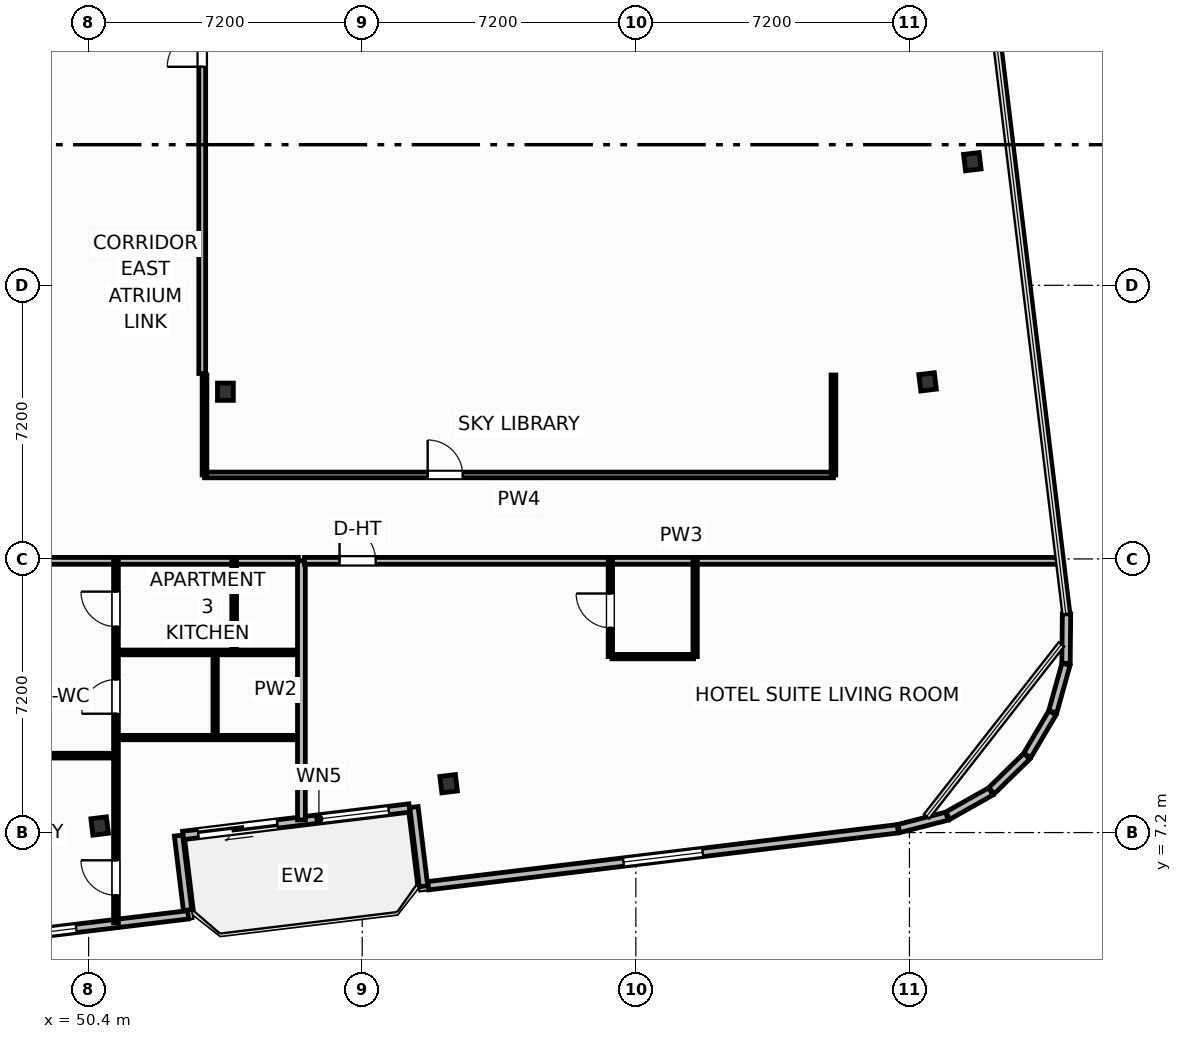
"""IFC4 building model, lengths in metres.
Left out: names, types, materials, properties, quantities, classifications, styles, units other than length and angle.
Written with IfcOpenShell. Run it as: python <this file> out.ifc"""

import sys

from ifc_helpers import new_model, si_unit, direction, frame, frame_2d, origin, origin_2d, place, context, subcontext, project, spatial, rectangle, i_section, extrude, element, fill, save


model = new_model("IFC4")
c1 = context("Model", 3, precision=1e-05, world=origin(), true_north=direction((0.0, 1.0)))
c2 = subcontext(c1, "Body", "Model", "MODEL_VIEW")
j1 = project(units=[si_unit("LENGTHUNIT", "METRE"), si_unit("PLANEANGLEUNIT", "RADIAN")], contexts=[c1])
p1 = place(None, origin())
s1 = spatial("IfcSite", under=j1, at=p1, CompositionType="ELEMENT")
p2 = place(p1, origin())
s2 = spatial("IfcBuilding", under=s1, at=p2, CompositionType="ELEMENT")
p3 = place(p2, frame((0.0, 0.0, 182.0)))
s3 = spatial("IfcBuildingStorey", under=s2, at=p3, CompositionType="ELEMENT", Elevation=182.0)
p4 = place(p3, frame((54.0, 18.8, 0.0), z_axis=(0.0, 0.0, 1.0), x_axis=(1.0, 0.0, 0.0)))
e1 = element("IfcColumn", 1, at=p4, inside=s3, PredefinedType="COLUMN", context=c2, shape_type="SweptSolid", body=[
    extrude(i_section(OverallWidth=0.418, OverallDepth=0.455, WebThickness=0.042, FlangeThickness=0.068, FilletRadius=0.025, at=origin_2d()), origin(), (0.0, 0.0, 1.0), 3.7),
])
for number, where, z_axis, x_axis in (
    (2, (50.691, 7.373, 0.0), (0.0, 0.0, 1.0), (0.993, 0.12, 0.0)),
    (3, (59.874, 8.486, 0.0), (0.0, 0.0, 1.0), (0.993, 0.12, 0.0)),
    (4, (72.477, 19.059, 0.0), (0.0, 0.0, 1.0), (0.993, 0.12, 0.0)),
    (5, (73.654, 24.853, 0.0), (0.0, 0.0, 1.0), (0.993, 0.12, 0.0)),
):
    element("IfcColumn", number, at=place(p3, frame(where, z_axis=z_axis, x_axis=x_axis)), inside=s3, PredefinedType="COLUMN", context=c2, shape_type="SweptSolid", body=[
        extrude(i_section(OverallWidth=0.412, OverallDepth=0.435, WebThickness=0.036, FlangeThickness=0.057, FilletRadius=0.025, at=origin_2d()), origin(), (0.0, 0.0, 1.0), 3.7),
    ])
p5 = place(p3, frame((58.843, 7.847, 0.0), z_axis=(0.0, 0.0, 1.0), x_axis=(-0.992729951822, -0.120362962556, 0.0)))
e6 = element("IfcWall", 6, at=p5, inside=s3, PredefinedType="SOLIDWALL", context=c2, shape_type="SweptSolid", body=[
    extrude(rectangle(XDim=6.0, YDim=0.22, at=frame_2d((3.0, 0.0))), origin(), (0.0, 0.0, 1.0), 2.73),
])
p6 = place(p5, frame((3.5, 0.0, 0.0)))
e7 = element("IfcOpeningElement", 7, at=p6, cuts=e6, PredefinedType="OPENING", context=c2, shape_type="SweptSolid", body=[
    extrude(rectangle(XDim=2.1, YDim=2.3, at=frame_2d((1.05, 1.15))), frame((0.0, 0.12, 0.0), z_axis=(0.0, -1.0, 0.0), x_axis=(1.0, 0.0, 0.0)), (0.0, 0.0, 1.0), 0.24),
])
p7 = place(p5, frame((0.55, 0.0, 0.75)))
e8 = element("IfcOpeningElement", 8, at=p7, cuts=e6, PredefinedType="OPENING", context=c2, shape_type="SweptSolid", body=[
    extrude(rectangle(XDim=1.85, YDim=1.75, at=frame_2d((0.925, 0.875))), frame((0.0, 0.12, 0.0), z_axis=(0.0, -1.0, 0.0), x_axis=(1.0, 0.0, 0.0)), (0.0, 0.0, 1.0), 0.24),
])
p8 = place(p3, frame((45.042, 4.069, 0.0), z_axis=(0.0, 0.0, 1.0), x_axis=(0.992731032022, 0.120354052946, 0.0)))
e9 = element("IfcWall", 9, at=p8, inside=s3, PredefinedType="SOLIDWALL", context=c2, shape_type="SweptSolid", body=[
    extrude(rectangle(XDim=8.035, YDim=0.22, at=frame_2d((4.018, 0.0))), origin(), (0.0, 0.0, 1.0), 2.73),
])
p9 = place(p8, frame((2.968, 0.0, 0.8)))
e10 = element("IfcOpeningElement", 10, at=p9, cuts=e9, PredefinedType="OPENING", context=c2, shape_type="SweptSolid", body=[
    extrude(rectangle(XDim=2.1, YDim=1.75, at=frame_2d((1.05, 0.875))), frame((0.0, 0.12, 0.0), z_axis=(0.0, -1.0, 0.0), x_axis=(1.0, 0.0, 0.0)), (0.0, 0.0, 1.0), 0.24),
])
p10 = place(p3, frame((53.004, 5.16, 0.0), z_axis=(0.0, 0.0, 1.0), x_axis=(-0.120397815541, 0.992725725472, 0.0)))
e11 = element("IfcWall", 11, at=p10, inside=s3, PredefinedType="SOLIDWALL", context=c2, shape_type="SweptSolid", body=[
    extrude(rectangle(XDim=1.975, YDim=0.22, at=frame_2d((0.988, 0.0))), origin(), (0.0, 0.0, 1.0), 2.73),
])
p11 = place(p3, frame((58.961, 7.872, 0.0), z_axis=(0.0, 0.0, 1.0), x_axis=(0.120327895535, -0.992734202874, 0.0)))
e12 = element("IfcWall", 12, at=p11, inside=s3, PredefinedType="SOLIDWALL", context=c2, shape_type="SweptSolid", body=[
    extrude(rectangle(XDim=2.1, YDim=0.22, at=frame_2d((1.05, 0.0))), origin(), (0.0, 0.0, 1.0), 2.73),
])
p12 = place(p3, frame((59.338, 5.802, 0.0), z_axis=(0.0, 0.0, 1.0), x_axis=(0.992731225757, 0.120352454927, 0.0)))
e13 = element("IfcWall", 13, at=p12, inside=s3, PredefinedType="SOLIDWALL", context=c2, shape_type="SweptSolid", body=[
    extrude(rectangle(XDim=12.447, YDim=0.22, at=frame_2d((6.224, 0.0))), origin(), (0.0, 0.0, 1.0), 2.73),
])
p13 = place(p12, frame((5.174, 0.0, 0.8)))
e14 = element("IfcOpeningElement", 14, at=p13, cuts=e13, PredefinedType="OPENING", context=c2, shape_type="SweptSolid", body=[
    extrude(rectangle(XDim=2.1, YDim=1.75, at=frame_2d((1.05, 0.875))), frame((0.0, 0.12, 0.0), z_axis=(0.0, -1.0, 0.0), x_axis=(1.0, 0.0, 0.0)), (0.0, 0.0, 1.0), 0.24),
])
p14 = place(p3, frame((71.719, 7.306, 0.0), z_axis=(0.0, 0.0, 1.0), x_axis=(0.968541764193, 0.248851061909, 0.0)))
e15 = element("IfcWall", 15, at=p14, inside=s3, PredefinedType="SOLIDWALL", context=c2, shape_type="SweptSolid", body=[
    extrude(rectangle(XDim=1.309, YDim=0.22, at=frame_2d((0.654, 0.0))), origin(), (0.0, 0.0, 1.0), 2.73),
])
for number, where, z_axis, x_axis in (
    (16, (73.008, 7.644, 0.0), (0.0, 0.0, 1.0), (0.871, 0.491, 0.0)),
    (17, (74.159, 8.3, 0.0), (0.0, 0.0, 1.0), (0.714, 0.7, 0.0)),
    (18, (75.101, 9.232, 0.0), (0.0, 0.0, 1.0), (0.509, 0.861, 0.0)),
    (19, (75.77, 10.376, 0.0), (0.0, 0.0, 1.0), (0.269, 0.963, 0.0)),
):
    element("IfcWall", number, at=place(p3, frame(where, z_axis=z_axis, x_axis=x_axis)), inside=s3, PredefinedType="SOLIDWALL", context=c2, shape_type="SweptSolid", body=[
        extrude(rectangle(XDim=1.301, YDim=0.22, at=frame_2d((0.65, 0.0))), origin(), (0.0, 0.0, 1.0), 2.73),
    ])
p15 = place(p3, frame((76.12, 11.654, 0.0), z_axis=(0.0, 0.0, 1.0), x_axis=(0.01032033607, 0.999946743914, 0.0)))
e20 = element("IfcWall", 20, at=p15, inside=s3, PredefinedType="SOLIDWALL", context=c2, shape_type="SweptSolid", body=[
    extrude(rectangle(XDim=1.301, YDim=0.22, at=frame_2d((0.65, 0.0))), origin(), (0.0, 0.0, 1.0), 2.73),
])
p16 = place(p3, frame((53.45, 16.61, 0.0), z_axis=(0.0, 0.0, 1.0), x_axis=(1.0, 0.0, 0.0)))
e21 = element("IfcWall", 21, at=p16, inside=s3, PredefinedType="PARTITIONING", context=c2, shape_type="SweptSolid", body=[
    extrude(rectangle(XDim=16.55, YDim=0.15, at=frame_2d((8.275, 0.0))), origin(), (0.0, 0.0, 1.0), 3.45),
])
p17 = place(p16, frame((5.873, 0.0, 0.0)))
e22 = element("IfcOpeningElement", 22, at=p17, cuts=e21, PredefinedType="OPENING", context=c2, shape_type="SweptSolid", body=[
    extrude(rectangle(XDim=0.92, YDim=2.05, at=frame_2d((0.46, 1.025))), frame((0.0, 0.085, 0.0), z_axis=(0.0, -1.0, 0.0), x_axis=(1.0, 0.0, 0.0)), (0.0, 0.0, 1.0), 0.17),
])
p18 = place(p3, frame((53.45, 16.61, 0.0), z_axis=(0.0, 0.0, 1.0), x_axis=(0.0, 1.0, 0.0)))
e23 = element("IfcWall", 23, at=p18, inside=s3, PredefinedType="PARTITIONING", context=c2, shape_type="SweptSolid", body=[
    extrude(rectangle(XDim=2.63, YDim=0.125, at=frame_2d((1.315, 0.0))), origin(), (0.0, 0.0, 1.0), 2.662),
])
p19 = place(p3, frame((70.0, 16.61, 0.0), z_axis=(0.0, 0.0, 1.0), x_axis=(0.0, 1.0, 0.0)))
e24 = element("IfcWall", 24, at=p19, inside=s3, PredefinedType="PARTITIONING", context=c2, shape_type="SweptSolid", body=[
    extrude(rectangle(XDim=2.63, YDim=0.125, at=frame_2d((1.315, 0.0))), origin(), (0.0, 0.0, 1.0), 3.45),
])
p20 = place(p3, frame((42.08, 9.224, 0.0), z_axis=(0.0, 0.0, 1.0), x_axis=(1.0, 0.0, 0.0)))
e25 = element("IfcWall", 25, at=p20, inside=s3, PredefinedType="PARTITIONING", context=c2, shape_type="SweptSolid", body=[
    extrude(rectangle(XDim=8.97, YDim=0.125, at=frame_2d((4.485, 0.0))), origin(), (0.0, 0.0, 1.0), 3.45),
])
p21 = place(p20, frame((4.037, 0.0, 0.0)))
e26 = element("IfcOpeningElement", 26, at=p21, cuts=e25, PredefinedType="OPENING", context=c2, shape_type="SweptSolid", body=[
    extrude(rectangle(XDim=0.92, YDim=2.05, at=frame_2d((0.46, 1.025))), frame((0.0, 0.073, 0.0), z_axis=(0.0, -1.0, 0.0), x_axis=(1.0, 0.0, 0.0)), (0.0, 0.0, 1.0), 0.145),
])
p22 = place(p3, frame((42.08, 14.35, 0.0), z_axis=(0.0, 0.0, 1.0), x_axis=(1.0, 0.0, 0.0)))
e27 = element("IfcWall", 27, at=p22, inside=s3, PredefinedType="PARTITIONING", context=c2, shape_type="SweptSolid", body=[
    extrude(rectangle(XDim=13.84, YDim=0.18, at=frame_2d((6.92, 0.0))), origin(), (0.0, 0.0, 1.0), 3.45),
])
p23 = place(p22, frame((3.985, 0.0, 0.0)))
e28 = element("IfcOpeningElement", 28, at=p23, cuts=e27, PredefinedType="OPENING", context=c2, shape_type="SweptSolid", body=[
    extrude(rectangle(XDim=1.0, YDim=2.2, at=frame_2d((0.5, 1.1))), frame((0.0, 0.1, 0.0), z_axis=(0.0, -1.0, 0.0), x_axis=(1.0, 0.0, 0.0)), (0.0, 0.0, 1.0), 0.2),
])
p24 = place(p3, frame((51.12, 4.826, 0.0), z_axis=(0.0, 0.0, 1.0), x_axis=(0.0, 1.0, 0.0)))
e29 = element("IfcWall", 29, at=p24, inside=s3, PredefinedType="PARTITIONING", context=c2, shape_type="SweptSolid", body=[
    extrude(rectangle(XDim=9.524, YDim=0.125, at=frame_2d((4.762, 0.0))), origin(), (0.0, 0.0, 1.0), 2.662),
])
p25 = place(p24, frame((0.725, 0.0, 0.0)))
e30 = element("IfcOpeningElement", 30, at=p25, cuts=e29, PredefinedType="OPENING", context=c2, shape_type="SweptSolid", body=[
    extrude(rectangle(XDim=0.92, YDim=2.05, at=frame_2d((0.46, 1.025))), frame((0.0, 0.073, 0.0), z_axis=(0.0, -1.0, 0.0), x_axis=(1.0, 0.0, 0.0)), (0.0, 0.0, 1.0), 0.145),
])
p26 = place(p24, frame((5.502, 0.0, 0.0)))
e31 = element("IfcOpeningElement", 31, at=p26, cuts=e29, PredefinedType="OPENING", context=c2, shape_type="SweptSolid", body=[
    extrude(rectangle(XDim=0.9, YDim=2.05, at=frame_2d((0.45, 1.025))), frame((0.0, 0.073, 0.0), z_axis=(0.0, -1.0, 0.0), x_axis=(1.0, 0.0, 0.0)), (0.0, 0.0, 1.0), 0.145),
])
p27 = place(p24, frame((7.794, 0.0, 0.0)))
e32 = element("IfcOpeningElement", 32, at=p27, cuts=e29, PredefinedType="OPENING", context=c2, shape_type="SweptSolid", body=[
    extrude(rectangle(XDim=0.92, YDim=2.05, at=frame_2d((0.46, 1.025))), frame((0.0, 0.073, 0.0), z_axis=(0.0, -1.0, 0.0), x_axis=(1.0, 0.0, 0.0)), (0.0, 0.0, 1.0), 0.145),
])
p28 = place(p3, frame((51.19, 11.94, 0.0), z_axis=(0.0, 0.0, 1.0), x_axis=(1.0, 0.0, 0.0)))
e33 = element("IfcWall", 33, at=p28, inside=s3, PredefinedType="PARTITIONING", context=c2, shape_type="SweptSolid", body=[
    extrude(rectangle(XDim=4.73, YDim=0.125, at=frame_2d((2.365, 0.0))), origin(), (0.0, 0.0, 1.0), 3.018),
])
p29 = place(p3, frame((51.19, 9.7, 0.0), z_axis=(0.0, 0.0, 1.0), x_axis=(1.0, 0.0, 0.0)))
e34 = element("IfcWall", 34, at=p29, inside=s3, PredefinedType="PARTITIONING", context=c2, shape_type="SweptSolid", body=[
    extrude(rectangle(XDim=4.73, YDim=0.115, at=frame_2d((2.365, 0.0))), origin(), (0.0, 0.0, 1.0), 3.45),
])
p30 = place(p3, frame((54.23, 11.94, 0.0), z_axis=(0.0, 0.0, 1.0), x_axis=(0.0, 1.0, 0.0)))
e35 = element("IfcWall", 35, at=p30, inside=s3, PredefinedType="PARTITIONING", context=c2, shape_type="SweptSolid", body=[
    extrude(rectangle(XDim=2.41, YDim=0.125, at=frame_2d((1.205, 0.0))), origin(), (0.0, 0.0, 1.0), 3.45),
])
p31 = place(p3, frame((53.73, 9.7, 0.0), z_axis=(0.0, 0.0, 1.0), x_axis=(0.0, 1.0, 0.0)))
e36 = element("IfcWall", 36, at=p31, inside=s3, PredefinedType="PARTITIONING", context=c2, shape_type="SweptSolid", body=[
    extrude(rectangle(XDim=2.24, YDim=0.115, at=frame_2d((1.12, 0.0))), origin(), (0.0, 0.0, 1.0), 3.45),
])
p32 = place(p3, frame((56.0, 7.533, 0.0), z_axis=(0.0, 0.0, 1.0), x_axis=(0.0, 1.0, 0.0)))
e37 = element("IfcWall", 37, at=p32, inside=s3, PredefinedType="PARTITIONING", context=c2, shape_type="SweptSolid", body=[
    extrude(rectangle(XDim=6.817, YDim=0.205, at=frame_2d((3.409, 0.0))), origin(), (0.0, 0.0, 1.0), 3.45),
])
p33 = place(p3, frame((56.08, 14.35, 0.0), z_axis=(0.0, 0.0, 1.0), x_axis=(1.0, 0.0, 0.0)))
e38 = element("IfcWall", 38, at=p33, inside=s3, PredefinedType="PARTITIONING", context=c2, shape_type="SweptSolid", body=[
    extrude(rectangle(XDim=19.825, YDim=0.18, at=frame_2d((9.912, 0.0))), origin(), (0.0, 0.0, 1.0), 3.45),
])
p34 = place(p33, frame((0.923, 0.0, 0.0)))
e39 = element("IfcOpeningElement", 39, at=p34, cuts=e38, PredefinedType="OPENING", context=c2, shape_type="SweptSolid", body=[
    extrude(rectangle(XDim=0.95, YDim=2.15, at=frame_2d((0.475, 1.075))), frame((0.0, 0.1, 0.0), z_axis=(0.0, -1.0, 0.0), x_axis=(1.0, 0.0, 0.0)), (0.0, 0.0, 1.0), 0.2),
])
p35 = place(p3, frame((64.17, 11.83, 0.0), z_axis=(0.0, 0.0, 1.0), x_axis=(1.0, 0.0, 0.0)))
e40 = element("IfcWall", 40, at=p35, inside=s3, PredefinedType="PARTITIONING", context=c2, shape_type="SweptSolid", body=[
    extrude(rectangle(XDim=2.15, YDim=0.115, at=frame_2d((1.075, 0.0))), origin(), (0.0, 0.0, 1.0), 3.45),
])
p36 = place(p3, frame((64.13, 11.83, 0.0), z_axis=(0.0, 0.0, 1.0), x_axis=(0.0, 1.0, 0.0)))
e41 = element("IfcWall", 41, at=p36, inside=s3, PredefinedType="PARTITIONING", context=c2, shape_type="SweptSolid", body=[
    extrude(rectangle(XDim=2.52, YDim=0.115, at=frame_2d((1.26, 0.0))), origin(), (0.0, 0.0, 1.0), 3.45),
])
p37 = place(p36, frame((0.76, 0.0, 0.0)))
e42 = element("IfcOpeningElement", 42, at=p37, cuts=e41, PredefinedType="OPENING", context=c2, shape_type="SweptSolid", body=[
    extrude(rectangle(XDim=0.9, YDim=2.05, at=frame_2d((0.45, 1.025))), frame((0.0, 0.067, 0.0), z_axis=(0.0, -1.0, 0.0), x_axis=(1.0, 0.0, 0.0)), (0.0, 0.0, 1.0), 0.135),
])
p38 = place(p3, frame((66.36, 11.83, 0.0), z_axis=(0.0, 0.0, 1.0), x_axis=(0.0, 1.0, 0.0)))
e43 = element("IfcWall", 43, at=p38, inside=s3, PredefinedType="PARTITIONING", context=c2, shape_type="SweptSolid", body=[
    extrude(rectangle(XDim=2.52, YDim=0.115, at=frame_2d((1.26, 0.0))), origin(), (0.0, 0.0, 1.0), 3.45),
])
p39 = place(p3, frame((53.39, 19.28, 0.0), z_axis=(0.0, 0.0, 1.0), x_axis=(0.0, 1.0, 0.0)))
e44 = element("IfcWall", 44, at=p39, inside=s3, PredefinedType="PARTITIONING", context=c2, shape_type="SweptSolid", body=[
    extrude(rectangle(XDim=20.02, YDim=0.18, at=frame_2d((10.01, 0.0))), origin(), (0.0, 0.0, 1.0), 3.45),
])
p40 = place(p39, frame((8.07, 0.0, 0.0)))
e45 = element("IfcOpeningElement", 45, at=p40, cuts=e44, PredefinedType="OPENING", context=c2, shape_type="SweptSolid", body=[
    extrude(rectangle(XDim=0.92, YDim=2.05, at=frame_2d((0.46, 1.025))), frame((0.0, 0.1, 0.0), z_axis=(0.0, -1.0, 0.0), x_axis=(1.0, 0.0, 0.0)), (0.0, 0.0, 1.0), 0.2),
])
p41 = place(p6, origin())
e46 = element("IfcDoor", 46, at=p41, inside=s3, OperationType="SLIDING_TO_LEFT", PredefinedType="DOOR", context=c2, shape_type="SweptSolid", body=[
    extrude(rectangle(XDim=2.1, YDim=2.3, at=frame_2d((1.05, 1.15))), frame((0.0, 0.025, 0.0), z_axis=(0.0, -1.0, 0.0), x_axis=(1.0, 0.0, 0.0)), (0.0, 0.0, 1.0), 0.05),
])
fill(e7, e46)
p42 = place(p7, origin())
e47 = element("IfcWindow", 47, at=p42, inside=s3, PartitioningType="SINGLE_PANEL", PredefinedType="WINDOW", context=c2, shape_type="SweptSolid", body=[
    extrude(rectangle(XDim=1.85, YDim=1.75, at=frame_2d((0.925, 0.875))), frame((0.0, 0.03, 0.0), z_axis=(0.0, -1.0, 0.0), x_axis=(1.0, 0.0, 0.0)), (0.0, 0.0, 1.0), 0.06),
])
fill(e8, e47)
p43 = place(p9, origin())
e48 = element("IfcWindow", 48, at=p43, inside=s3, PartitioningType="SINGLE_PANEL", PredefinedType="WINDOW", context=c2, shape_type="SweptSolid", body=[
    extrude(rectangle(XDim=2.1, YDim=1.75, at=frame_2d((1.05, 0.875))), frame((0.0, 0.03, 0.0), z_axis=(0.0, -1.0, 0.0), x_axis=(1.0, 0.0, 0.0)), (0.0, 0.0, 1.0), 0.06),
])
fill(e10, e48)
p44 = place(p13, origin())
e49 = element("IfcWindow", 49, at=p44, inside=s3, PartitioningType="SINGLE_PANEL", PredefinedType="WINDOW", context=c2, shape_type="SweptSolid", body=[
    extrude(rectangle(XDim=2.1, YDim=1.75, at=frame_2d((1.05, 0.875))), frame((0.0, 0.03, 0.0), z_axis=(0.0, -1.0, 0.0), x_axis=(1.0, 0.0, 0.0)), (0.0, 0.0, 1.0), 0.06),
])
fill(e14, e49)
p45 = place(p17, origin())
e50 = element("IfcDoor", 50, at=p45, inside=s3, OperationType="SINGLE_SWING_LEFT", PredefinedType="DOOR", context=c2, shape_type="SweptSolid", body=[
    extrude(rectangle(XDim=0.92, YDim=2.05, at=frame_2d((0.46, 1.025))), frame((0.0, 0.025, 0.0), z_axis=(0.0, -1.0, 0.0), x_axis=(1.0, 0.0, 0.0)), (0.0, 0.0, 1.0), 0.05),
])
fill(e22, e50)
p46 = place(p25, origin())
e51 = element("IfcDoor", 51, at=p46, inside=s3, OperationType="SINGLE_SWING_RIGHT", PredefinedType="DOOR", context=c2, shape_type="SweptSolid", body=[
    extrude(rectangle(XDim=0.92, YDim=2.05, at=frame_2d((0.46, 1.025))), frame((0.0, 0.025, 0.0), z_axis=(0.0, -1.0, 0.0), x_axis=(1.0, 0.0, 0.0)), (0.0, 0.0, 1.0), 0.05),
])
fill(e30, e51)
p47 = place(p26, origin())
e52 = element("IfcDoor", 52, at=p47, inside=s3, OperationType="SINGLE_SWING_LEFT", PredefinedType="DOOR", context=c2, shape_type="SweptSolid", body=[
    extrude(rectangle(XDim=0.9, YDim=2.05, at=frame_2d((0.45, 1.025))), frame((0.0, 0.025, 0.0), z_axis=(0.0, -1.0, 0.0), x_axis=(1.0, 0.0, 0.0)), (0.0, 0.0, 1.0), 0.05),
])
fill(e31, e52)
p48 = place(p27, origin())
e53 = element("IfcDoor", 53, at=p48, inside=s3, OperationType="SINGLE_SWING_RIGHT", PredefinedType="DOOR", context=c2, shape_type="SweptSolid", body=[
    extrude(rectangle(XDim=0.92, YDim=2.05, at=frame_2d((0.46, 1.025))), frame((0.0, 0.025, 0.0), z_axis=(0.0, -1.0, 0.0), x_axis=(1.0, 0.0, 0.0)), (0.0, 0.0, 1.0), 0.05),
])
fill(e32, e53)
p49 = place(p34, origin())
e54 = element("IfcDoor", 54, at=p49, inside=s3, OperationType="SINGLE_SWING_LEFT", PredefinedType="DOOR", context=c2, shape_type="SweptSolid", body=[
    extrude(rectangle(XDim=0.95, YDim=2.15, at=frame_2d((0.475, 1.075))), frame((0.0, 0.025, 0.0), z_axis=(0.0, -1.0, 0.0), x_axis=(1.0, 0.0, 0.0)), (0.0, 0.0, 1.0), 0.05),
])
fill(e39, e54)
p50 = place(p37, origin())
e55 = element("IfcDoor", 55, at=p50, inside=s3, OperationType="SINGLE_SWING_RIGHT", PredefinedType="DOOR", context=c2, shape_type="SweptSolid", body=[
    extrude(rectangle(XDim=0.9, YDim=2.05, at=frame_2d((0.45, 1.025))), frame((0.0, 0.025, 0.0), z_axis=(0.0, -1.0, 0.0), x_axis=(1.0, 0.0, 0.0)), (0.0, 0.0, 1.0), 0.05),
])
fill(e42, e55)
p51 = place(p40, origin())
e56 = element("IfcDoor", 56, at=p51, inside=s3, OperationType="SINGLE_SWING_LEFT", PredefinedType="DOOR", context=c2, shape_type="SweptSolid", body=[
    extrude(rectangle(XDim=0.92, YDim=2.05, at=frame_2d((0.46, 1.025))), frame((0.0, 0.025, 0.0), z_axis=(0.0, -1.0, 0.0), x_axis=(1.0, 0.0, 0.0)), (0.0, 0.0, 1.0), 0.05),
])
fill(e45, e56)
save(model, sys.argv[1])
